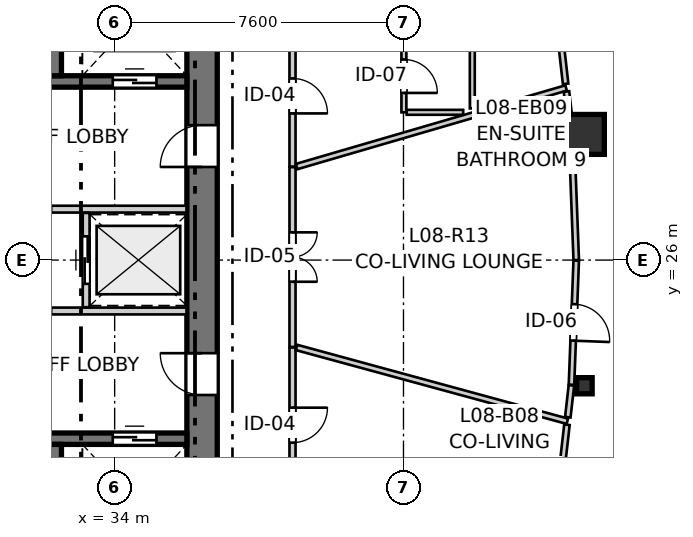
"""IFC4 building model, lengths in metres.
Left out: names, types, materials, properties, quantities, classifications, styles, units other than length and angle.
Written with IfcOpenShell. Run it as: python <this file> out.ifc"""

import sys

from ifc_helpers import new_model, si_unit, direction, frame, frame_2d, origin, origin_2d, place, context, subcontext, project, spatial, rectangle, i_section, extrude, source, transform, mapped, element, fill, save


model = new_model("IFC4")
c1 = context("Model", 3, precision=1e-05, world=origin(), true_north=direction((0.0, 1.0)))
c2 = subcontext(c1, "Body", "Model", "MODEL_VIEW")
j1 = project(units=[si_unit("LENGTHUNIT", "METRE"), si_unit("PLANEANGLEUNIT", "RADIAN")], contexts=[c1])
p1 = place(None, origin())
s1 = spatial("IfcSite", under=j1, at=p1, CompositionType="ELEMENT")
p2 = place(p1, origin())
s2 = spatial("IfcBuilding", under=s1, at=p2, CompositionType="ELEMENT")
p3 = place(p2, frame((0.0, 0.0, 30.2)))
s3 = spatial("IfcBuildingStorey", under=s2, at=p3, CompositionType="ELEMENT", Elevation=30.2)
p4 = place(p3, frame((36.3, 18.2, 0.0), z_axis=(0.0, 0.0, 1.0), x_axis=(0.0, 1.0, 0.0)))
e1 = element("IfcWall", 1, at=p4, inside=s3, PredefinedType="SHEAR", context=c2, shape_type="SweptSolid", body=[
    extrude(rectangle(XDim=15.6, YDim=0.8, at=frame_2d((7.8, 0.0))), origin(), (0.0, 0.0, 1.0), 2.935),
])
p5 = place(p4, frame((4.25, 0.0, 0.0)))
e2 = element("IfcOpeningElement", 2, at=p5, cuts=e1, PredefinedType="OPENING", context=c2, shape_type="SweptSolid", body=[
    extrude(rectangle(XDim=1.1, YDim=2.15, at=frame_2d((0.55, 1.075))), frame((0.0, 0.41, 0.0), z_axis=(0.0, -1.0, 0.0), x_axis=(1.0, 0.0, 0.0)), (0.0, 0.0, 1.0), 0.82),
])
p6 = place(p4, frame((10.25, 0.0, 0.0)))
e3 = element("IfcOpeningElement", 3, at=p6, cuts=e1, PredefinedType="OPENING", context=c2, shape_type="SweptSolid", body=[
    extrude(rectangle(XDim=1.1, YDim=2.15, at=frame_2d((0.55, 1.075))), frame((0.0, 0.41, 0.0), z_axis=(0.0, -1.0, 0.0), x_axis=(1.0, 0.0, 0.0)), (0.0, 0.0, 1.0), 0.82),
])
p7 = place(p3, frame((24.8, 21.3, 0.0), z_axis=(0.0, 0.0, 1.0), x_axis=(1.0, 0.0, 0.0)))
e4 = element("IfcWall", 4, at=p7, inside=s3, PredefinedType="SHEAR", context=c2, shape_type="SweptSolid", body=[
    extrude(rectangle(XDim=11.1, YDim=0.3, at=frame_2d((5.55, 0.0))), origin(), (0.0, 0.0, 1.0), 2.935),
])
p8 = place(p7, frame((6.22, 0.0, 0.0)))
e5 = element("IfcOpeningElement", 5, at=p8, cuts=e4, PredefinedType="OPENING", context=c2, shape_type="SweptSolid", body=[
    extrude(rectangle(XDim=0.98, YDim=2.15, at=frame_2d((0.49, 1.075))), frame((0.0, 0.16, 0.0), z_axis=(0.0, -1.0, 0.0), x_axis=(1.0, 0.0, 0.0)), (0.0, 0.0, 1.0), 0.32),
])
p9 = place(p7, frame((9.15, 0.0, 0.0)))
e6 = element("IfcOpeningElement", 6, at=p9, cuts=e4, PredefinedType="OPENING", context=c2, shape_type="SweptSolid", body=[
    extrude(rectangle(XDim=1.15, YDim=2.15, at=frame_2d((0.575, 1.075))), frame((0.0, 0.16, 0.0), z_axis=(0.0, -1.0, 0.0), x_axis=(1.0, 0.0, 0.0)), (0.0, 0.0, 1.0), 0.32),
])
p10 = place(p3, frame((32.4, 18.2, 0.0), z_axis=(0.0, 0.0, 1.0), x_axis=(0.0, 1.0, 0.0)))
e7 = element("IfcWall", 7, at=p10, inside=s3, PredefinedType="SHEAR", context=c2, shape_type="SweptSolid", body=[
    extrude(rectangle(XDim=2.95, YDim=0.4, at=frame_2d((1.475, 0.0))), origin(), (0.0, 0.0, 1.0), 2.935),
])
p11 = place(p3, frame((24.8, 30.7, 0.0), z_axis=(0.0, 0.0, 1.0), x_axis=(1.0, 0.0, 0.0)))
e8 = element("IfcWall", 8, at=p11, inside=s3, PredefinedType="SHEAR", context=c2, shape_type="SweptSolid", body=[
    extrude(rectangle(XDim=11.1, YDim=0.3, at=frame_2d((5.55, 0.0))), origin(), (0.0, 0.0, 1.0), 2.935),
])
p12 = place(p11, frame((6.22, 0.0, 0.0)))
e9 = element("IfcOpeningElement", 9, at=p12, cuts=e8, PredefinedType="OPENING", context=c2, shape_type="SweptSolid", body=[
    extrude(rectangle(XDim=0.98, YDim=2.15, at=frame_2d((0.49, 1.075))), frame((0.0, 0.16, 0.0), z_axis=(0.0, -1.0, 0.0), x_axis=(1.0, 0.0, 0.0)), (0.0, 0.0, 1.0), 0.32),
])
p13 = place(p11, frame((9.15, 0.0, 0.0)))
e10 = element("IfcOpeningElement", 10, at=p13, cuts=e8, PredefinedType="OPENING", context=c2, shape_type="SweptSolid", body=[
    extrude(rectangle(XDim=1.15, YDim=2.15, at=frame_2d((0.575, 1.075))), frame((0.0, 0.16, 0.0), z_axis=(0.0, -1.0, 0.0), x_axis=(1.0, 0.0, 0.0)), (0.0, 0.0, 1.0), 0.32),
])
p14 = place(p3, frame((32.4, 30.85, 0.0), z_axis=(0.0, 0.0, 1.0), x_axis=(0.0, 1.0, 0.0)))
e11 = element("IfcWall", 11, at=p14, inside=s3, PredefinedType="SHEAR", context=c2, shape_type="SweptSolid", body=[
    extrude(rectangle(XDim=2.95, YDim=0.4, at=frame_2d((1.475, 0.0))), origin(), (0.0, 0.0, 1.0), 2.935),
])
m1 = source(origin(), c2, "Body", "SweptSolid", [
    extrude(i_section(OverallWidth=0.409, OverallDepth=0.425, WebThickness=0.03, FlangeThickness=0.048, FilletRadius=0.015, at=origin_2d()), origin(), (0.0, 0.0, 1.0), 2.935),
])
p15 = place(p3, frame((46.361, 22.694, 0.0), z_axis=(0.0, 0.0, 1.0), x_axis=(1.0, 0.0, 0.0)))
e12 = element("IfcColumn", 12, at=p15, inside=s3, PredefinedType="PILASTER", context=c2, shape_type="MappedRepresentation", body=[
    mapped(m1, transform((0.0, 0.0, 0.0), x_axis=(1.0, 0.0, 0.0), y_axis=(0.0, 1.0, 0.0), z_axis=(0.0, 0.0, 1.0), scale=1.0)),
])
m2 = source(origin(), c2, "Body", "SweptSolid", [
    extrude(rectangle(XDim=1.05, YDim=1.05, at=origin_2d()), origin(), (0.0, 0.0, 1.0), 2.935),
])
p16 = place(p3, frame((46.361, 29.306, 0.0), z_axis=(0.0, 0.0, 1.0), x_axis=(1.0, 0.0, 0.0)))
e13 = element("IfcColumn", 13, at=p16, inside=s3, PredefinedType="COLUMN", context=c2, shape_type="MappedRepresentation", body=[
    mapped(m2, transform((0.0, 0.0, 0.0), x_axis=(1.0, 0.0, 0.0), y_axis=(0.0, 1.0, 0.0), z_axis=(0.0, 0.0, 1.0), scale=1.0)),
])
p17 = place(p3, frame((30.67, 24.66, 0.0), z_axis=(0.0, 0.0, 1.0), x_axis=(1.0, 0.0, 0.0)))
e14 = element("IfcWall", 14, at=p17, inside=s3, PredefinedType="PARTITIONING", context=c2, shape_type="SweptSolid", body=[
    extrude(rectangle(XDim=5.22, YDim=0.18, at=frame_2d((2.61, 0.0))), origin(), (0.0, 0.0, 1.0), 2.935),
])
p18 = place(p17, frame((0.68, 0.0, 0.0)))
e15 = element("IfcOpeningElement", 15, at=p18, cuts=e14, PredefinedType="OPENING", context=c2, shape_type="SweptSolid", body=[
    extrude(rectangle(XDim=0.98, YDim=2.15, at=frame_2d((0.49, 1.075))), frame((0.0, 0.1, 0.0), z_axis=(0.0, -1.0, 0.0), x_axis=(1.0, 0.0, 0.0)), (0.0, 0.0, 1.0), 0.2),
])
p19 = place(p3, frame((30.67, 27.34, 0.0), z_axis=(0.0, 0.0, 1.0), x_axis=(1.0, 0.0, 0.0)))
e16 = element("IfcWall", 16, at=p19, inside=s3, PredefinedType="PARTITIONING", context=c2, shape_type="SweptSolid", body=[
    extrude(rectangle(XDim=5.22, YDim=0.18, at=frame_2d((2.61, 0.0))), origin(), (0.0, 0.0, 1.0), 2.935),
])
p20 = place(p19, frame((0.68, 0.0, 0.0)))
e17 = element("IfcOpeningElement", 17, at=p20, cuts=e16, PredefinedType="OPENING", context=c2, shape_type="SweptSolid", body=[
    extrude(rectangle(XDim=0.98, YDim=2.15, at=frame_2d((0.49, 1.075))), frame((0.0, 0.1, 0.0), z_axis=(0.0, -1.0, 0.0), x_axis=(1.0, 0.0, 0.0)), (0.0, 0.0, 1.0), 0.2),
])
p21 = place(p3, frame((33.25, 24.76, 0.0), z_axis=(0.0, 0.0, 1.0), x_axis=(0.0, 1.0, 0.0)))
e18 = element("IfcWall", 18, at=p21, inside=s3, PredefinedType="PARTITIONING", context=c2, shape_type="SweptSolid", body=[
    extrude(rectangle(XDim=2.48, YDim=0.18, at=frame_2d((1.24, 0.0))), origin(), (0.0, 0.0, 1.0), 2.935),
])
p22 = place(p21, frame((0.615, 0.0, 0.0)))
e19 = element("IfcOpeningElement", 19, at=p22, cuts=e18, PredefinedType="OPENING", context=c2, shape_type="SweptSolid", body=[
    extrude(rectangle(XDim=1.25, YDim=2.15, at=frame_2d((0.625, 1.075))), frame((0.0, 0.1, 0.0), z_axis=(0.0, -1.0, 0.0), x_axis=(1.0, 0.0, 0.0)), (0.0, 0.0, 1.0), 0.2),
])
p23 = place(p3, frame((38.68, 28.445, 0.0), z_axis=(0.0, 0.0, 1.0), x_axis=(0.0, -1.0, 0.0)))
e20 = element("IfcWall", 20, at=p23, inside=s3, PredefinedType="PARTITIONING", context=c2, shape_type="SweptSolid", body=[
    extrude(rectangle(XDim=4.731, YDim=0.16, at=frame_2d((2.365, 0.0))), origin(), (0.0, 0.0, 1.0), 2.935),
])
p24 = place(p23, frame((1.716, 0.0, 0.0)))
e21 = element("IfcOpeningElement", 21, at=p24, cuts=e20, PredefinedType="OPENING", context=c2, shape_type="SweptSolid", body=[
    extrude(rectangle(XDim=1.3, YDim=2.1, at=frame_2d((0.65, 1.05))), frame((0.0, 0.09, 0.0), z_axis=(0.0, -1.0, 0.0), x_axis=(1.0, 0.0, 0.0)), (0.0, 0.0, 1.0), 0.18),
])
p25 = place(p3, frame((38.68, 23.699, 0.0), z_axis=(0.0, 0.0, 1.0), x_axis=(0.0, -1.0, 0.0)))
e22 = element("IfcWall", 22, at=p25, inside=s3, PredefinedType="PARTITIONING", context=c2, shape_type="SweptSolid", body=[
    extrude(rectangle(XDim=4.135, YDim=0.16, at=frame_2d((2.067, 0.0))), origin(), (0.0, 0.0, 1.0), 2.935),
])
p26 = place(p25, frame((1.583, 0.0, 0.0)))
e23 = element("IfcOpeningElement", 23, at=p26, cuts=e22, PredefinedType="OPENING", context=c2, shape_type="SweptSolid", body=[
    extrude(rectangle(XDim=0.92, YDim=2.1, at=frame_2d((0.46, 1.05))), frame((0.0, 0.09, 0.0), z_axis=(0.0, -1.0, 0.0), x_axis=(1.0, 0.0, 0.0)), (0.0, 0.0, 1.0), 0.18),
])
p27 = place(p3, frame((38.68, 32.175, 0.0), z_axis=(0.0, 0.0, 1.0), x_axis=(0.0, -1.0, 0.0)))
e24 = element("IfcWall", 24, at=p27, inside=s3, PredefinedType="PARTITIONING", context=c2, shape_type="SweptSolid", body=[
    extrude(rectangle(XDim=3.715, YDim=0.16, at=frame_2d((1.857, 0.0))), origin(), (0.0, 0.0, 1.0), 2.935),
])
p28 = place(p27, frame((1.396, 0.0, 0.0)))
e25 = element("IfcOpeningElement", 25, at=p28, cuts=e24, PredefinedType="OPENING", context=c2, shape_type="SweptSolid", body=[
    extrude(rectangle(XDim=0.92, YDim=2.1, at=frame_2d((0.46, 1.05))), frame((0.0, 0.09, 0.0), z_axis=(0.0, -1.0, 0.0), x_axis=(1.0, 0.0, 0.0)), (0.0, 0.0, 1.0), 0.18),
])
p29 = place(p3, frame((46.146, 25.985, 0.0), z_axis=(0.0, 0.0, 1.0), x_axis=(-0.038094618751, -0.999274136572, 0.0)))
e26 = element("IfcWall", 26, at=p29, inside=s3, PredefinedType="PARTITIONING", context=c2, shape_type="SweptSolid", body=[
    extrude(rectangle(XDim=3.269, YDim=0.145, at=frame_2d((1.634, 0.0))), origin(), (0.0, 0.0, 1.0), 2.403),
])
p30 = place(p29, frame((1.147, 0.0, 0.0)))
e27 = element("IfcOpeningElement", 27, at=p30, cuts=e26, PredefinedType="OPENING", context=c2, shape_type="SweptSolid", body=[
    extrude(rectangle(XDim=0.96, YDim=2.1, at=frame_2d((0.48, 1.05))), frame((0.0, 0.083, 0.0), z_axis=(0.0, -1.0, 0.0), x_axis=(1.0, 0.0, 0.0)), (0.0, 0.0, 1.0), 0.165),
])
p31 = place(p3, frame((41.611, 31.788, 0.0), z_axis=(0.0, 0.0, 1.0), x_axis=(0.0, -1.0, 0.0)))
e28 = element("IfcWall", 28, at=p31, inside=s3, PredefinedType="PARTITIONING", context=c2, shape_type="SweptSolid", body=[
    extrude(rectangle(XDim=1.9, YDim=0.13, at=frame_2d((0.95, 0.0))), origin(), (0.0, 0.0, 1.0), 2.935),
])
p32 = place(p31, frame((0.51, 0.0, 0.0)))
e29 = element("IfcOpeningElement", 29, at=p32, cuts=e28, PredefinedType="OPENING", context=c2, shape_type="SweptSolid", body=[
    extrude(rectangle(XDim=0.88, YDim=2.05, at=frame_2d((0.44, 1.025))), frame((0.0, 0.075, 0.0), z_axis=(0.0, -1.0, 0.0), x_axis=(1.0, 0.0, 0.0)), (0.0, 0.0, 1.0), 0.15),
])
p33 = place(p3, frame((38.788, 28.46, 0.0), z_axis=(0.0, 0.0, 1.0), x_axis=(0.959983709987, 0.280055845432, 0.0)))
e30 = element("IfcWall", 30, at=p33, inside=s3, PredefinedType="PARTITIONING", context=c2, shape_type="SweptSolid", body=[
    extrude(rectangle(XDim=7.386, YDim=0.145, at=frame_2d((3.693, 0.0))), origin(), (0.0, 0.0, 1.0), 2.935),
])
p34 = place(p3, frame((38.787, 23.701, 0.0), z_axis=(0.0, 0.0, 1.0), x_axis=(0.964810342249, -0.262946769308, 0.0)))
e31 = element("IfcWall", 31, at=p34, inside=s3, PredefinedType="PARTITIONING", context=c2, shape_type="SweptSolid", body=[
    extrude(rectangle(XDim=7.385, YDim=0.145, at=frame_2d((3.692, 0.0))), origin(), (0.0, 0.0, 1.0), 2.935),
])
p35 = place(p3, frame((46.021, 29.281, 0.0), z_axis=(0.0, 0.0, 1.0), x_axis=(0.038070453861, -0.999275057501, 0.0)))
e32 = element("IfcWall", 32, at=p35, inside=s3, PredefinedType="PARTITIONING", context=c2, shape_type="SweptSolid", body=[
    extrude(rectangle(XDim=3.283, YDim=0.145, at=frame_2d((1.642, 0.0))), origin(), (0.0, 0.0, 1.0), 2.403),
])
p36 = place(p3, frame((43.411, 29.99, 0.0), z_axis=(0.0, 0.0, 1.0), x_axis=(0.0, 1.0, 0.0)))
e33 = element("IfcWall", 33, at=p36, inside=s3, PredefinedType="PARTITIONING", context=c2, shape_type="SweptSolid", body=[
    extrude(rectangle(XDim=1.798, YDim=0.13, at=frame_2d((0.899, 0.0))), origin(), (0.0, 0.0, 1.0), 2.935),
])
p37 = place(p3, frame((41.684, 29.888, 0.0), z_axis=(0.0, 0.0, 1.0), x_axis=(1.0, 0.0, 0.0)))
e34 = element("IfcWall", 34, at=p37, inside=s3, PredefinedType="PARTITIONING", context=c2, shape_type="SweptSolid", body=[
    extrude(rectangle(XDim=1.487, YDim=0.13, at=frame_2d((0.743, 0.0))), origin(), (0.0, 0.0, 1.0), 2.935),
])
p38 = place(p3, frame((45.729, 20.146, 0.0), z_axis=(0.0, 0.0, 1.0), x_axis=(0.113074294354, 0.993586535716, 0.0)))
e35 = element("IfcWall", 35, at=p38, inside=s3, PredefinedType="PARTITIONING", context=c2, shape_type="SweptSolid", body=[
    extrude(rectangle(XDim=1.531, YDim=0.145, at=frame_2d((0.765, 0.0))), origin(), (0.0, 0.0, 1.0), 2.403),
])
p39 = place(p3, frame((45.89, 30.436, 0.0), z_axis=(0.0, 0.0, 1.0), x_axis=(0.113024308153, -0.993592223081, 0.0)))
e36 = element("IfcWall", 36, at=p39, inside=s3, PredefinedType="PARTITIONING", context=c2, shape_type="SweptSolid", body=[
    extrude(rectangle(XDim=1.147, YDim=0.145, at=frame_2d((0.573, 0.0))), origin(), (0.0, 0.0, 1.0), 2.403),
])
p40 = place(p3, frame((45.729, 31.854, 0.0), z_axis=(0.0, 0.0, 1.0), x_axis=(0.112860473391, -0.993610846129, 0.0)))
e37 = element("IfcWall", 37, at=p40, inside=s3, PredefinedType="PARTITIONING", context=c2, shape_type="SweptSolid", body=[
    extrude(rectangle(XDim=1.224, YDim=0.145, at=frame_2d((0.612, 0.0))), origin(), (0.0, 0.0, 1.0), 2.403),
])
p41 = place(p3, frame((45.924, 21.866, 0.0), z_axis=(0.0, 0.0, 1.0), x_axis=(0.112844765803, 0.993612630169, 0.0)))
e38 = element("IfcWall", 38, at=p41, inside=s3, PredefinedType="PARTITIONING", context=c2, shape_type="SweptSolid", body=[
    extrude(rectangle(XDim=0.844, YDim=0.145, at=frame_2d((0.422, 0.0))), origin(), (0.0, 0.0, 1.0), 2.403),
])
m3 = source(origin(), c2, "Body", "SweptSolid", [
    extrude(rectangle(XDim=1.15, YDim=2.15, at=frame_2d((0.575, 1.075))), frame((0.0, 0.025, 0.0), z_axis=(0.0, -1.0, 0.0), x_axis=(1.0, 0.0, 0.0)), (0.0, 0.0, 1.0), 0.05),
])
p42 = place(p9, origin())
e39 = element("IfcDoor", 39, at=p42, inside=s3, OperationType="DOUBLE_DOOR_SLIDING", PredefinedType="DOOR", context=c2, shape_type="MappedRepresentation", body=[
    mapped(m3, transform((0.0, 0.0, 0.0), x_axis=(1.0, 0.0, 0.0), y_axis=(0.0, 1.0, 0.0), z_axis=(0.0, 0.0, 1.0), scale=1.0)),
])
fill(e6, e39)
p43 = place(p13, origin())
e40 = element("IfcDoor", 40, at=p43, inside=s3, OperationType="DOUBLE_DOOR_SLIDING", PredefinedType="DOOR", context=c2, shape_type="MappedRepresentation", body=[
    mapped(m3, transform((0.0, 0.0, 0.0), x_axis=(1.0, 0.0, 0.0), y_axis=(0.0, 1.0, 0.0), z_axis=(0.0, 0.0, 1.0), scale=1.0)),
])
fill(e10, e40)
m4 = source(origin(), c2, "Body", "SweptSolid", [
    extrude(rectangle(XDim=1.1, YDim=2.15, at=frame_2d((0.55, 1.075))), frame((0.0, 0.025, 0.0), z_axis=(0.0, -1.0, 0.0), x_axis=(1.0, 0.0, 0.0)), (0.0, 0.0, 1.0), 0.05),
])
p44 = place(p5, origin())
e41 = element("IfcDoor", 41, at=p44, inside=s3, OperationType="SINGLE_SWING_RIGHT", PredefinedType="DOOR", context=c2, shape_type="MappedRepresentation", body=[
    mapped(m4, transform((0.0, 0.0, 0.0), x_axis=(1.0, 0.0, 0.0), y_axis=(0.0, 1.0, 0.0), z_axis=(0.0, 0.0, 1.0), scale=1.0)),
])
fill(e2, e41)
p45 = place(p6, origin())
e42 = element("IfcDoor", 42, at=p45, inside=s3, OperationType="SINGLE_SWING_LEFT", PredefinedType="DOOR", context=c2, shape_type="MappedRepresentation", body=[
    mapped(m4, transform((0.0, 0.0, 0.0), x_axis=(1.0, 0.0, 0.0), y_axis=(0.0, 1.0, 0.0), z_axis=(0.0, 0.0, 1.0), scale=1.0)),
])
fill(e3, e42)
m5 = source(origin(), c2, "Body", "SweptSolid", [
    extrude(rectangle(XDim=1.25, YDim=2.15, at=frame_2d((0.625, 1.075))), frame((0.0, 0.025, 0.0), z_axis=(0.0, -1.0, 0.0), x_axis=(1.0, 0.0, 0.0)), (0.0, 0.0, 1.0), 0.05),
])
p46 = place(p22, origin())
e43 = element("IfcDoor", 43, at=p46, inside=s3, OperationType="DOUBLE_DOOR_SLIDING", PredefinedType="DOOR", context=c2, shape_type="MappedRepresentation", body=[
    mapped(m5, transform((0.0, 0.0, 0.0), x_axis=(1.0, 0.0, 0.0), y_axis=(0.0, 1.0, 0.0), z_axis=(0.0, 0.0, 1.0), scale=1.0)),
])
fill(e19, e43)
m6 = source(origin(), c2, "Body", "SweptSolid", [
    extrude(rectangle(XDim=1.3, YDim=2.1, at=frame_2d((0.65, 1.05))), frame((0.0, 0.025, 0.0), z_axis=(0.0, -1.0, 0.0), x_axis=(1.0, 0.0, 0.0)), (0.0, 0.0, 1.0), 0.05),
])
p47 = place(p24, origin())
e44 = element("IfcDoor", 44, at=p47, inside=s3, OperationType="DOUBLE_DOOR_SINGLE_SWING", PredefinedType="DOOR", context=c2, shape_type="MappedRepresentation", body=[
    mapped(m6, transform((0.0, 0.0, 0.0), x_axis=(1.0, 0.0, 0.0), y_axis=(0.0, 1.0, 0.0), z_axis=(0.0, 0.0, 1.0), scale=1.0)),
])
fill(e21, e44)
m7 = source(origin(), c2, "Body", "SweptSolid", [
    extrude(rectangle(XDim=0.92, YDim=2.1, at=frame_2d((0.46, 1.05))), frame((0.0, 0.025, 0.0), z_axis=(0.0, -1.0, 0.0), x_axis=(1.0, 0.0, 0.0)), (0.0, 0.0, 1.0), 0.05),
])
p48 = place(p26, origin())
e45 = element("IfcDoor", 45, at=p48, inside=s3, OperationType="SINGLE_SWING_LEFT", PredefinedType="DOOR", context=c2, shape_type="MappedRepresentation", body=[
    mapped(m7, transform((0.0, 0.0, 0.0), x_axis=(1.0, 0.0, 0.0), y_axis=(0.0, 1.0, 0.0), z_axis=(0.0, 0.0, 1.0), scale=1.0)),
])
fill(e23, e45)
p49 = place(p28, origin())
e46 = element("IfcDoor", 46, at=p49, inside=s3, OperationType="SINGLE_SWING_RIGHT", PredefinedType="DOOR", context=c2, shape_type="MappedRepresentation", body=[
    mapped(m7, transform((0.0, 0.0, 0.0), x_axis=(1.0, 0.0, 0.0), y_axis=(0.0, 1.0, 0.0), z_axis=(0.0, 0.0, 1.0), scale=1.0)),
])
fill(e25, e46)
m8 = source(origin(), c2, "Body", "SweptSolid", [
    extrude(rectangle(XDim=0.96, YDim=2.1, at=frame_2d((0.48, 1.05))), frame((0.0, 0.025, 0.0), z_axis=(0.0, -1.0, 0.0), x_axis=(1.0, 0.0, 0.0)), (0.0, 0.0, 1.0), 0.05),
])
p50 = place(p30, origin())
e47 = element("IfcDoor", 47, at=p50, inside=s3, OperationType="SINGLE_SWING_RIGHT", PredefinedType="DOOR", context=c2, shape_type="MappedRepresentation", body=[
    mapped(m8, transform((0.0, 0.0, 0.0), x_axis=(1.0, 0.0, 0.0), y_axis=(0.0, 1.0, 0.0), z_axis=(0.0, 0.0, 1.0), scale=1.0)),
])
fill(e27, e47)
m9 = source(origin(), c2, "Body", "SweptSolid", [
    extrude(rectangle(XDim=0.88, YDim=2.05, at=frame_2d((0.44, 1.025))), frame((0.0, 0.025, 0.0), z_axis=(0.0, -1.0, 0.0), x_axis=(1.0, 0.0, 0.0)), (0.0, 0.0, 1.0), 0.05),
])
p51 = place(p32, origin())
e48 = element("IfcDoor", 48, at=p51, inside=s3, OperationType="SINGLE_SWING_RIGHT", PredefinedType="DOOR", context=c2, shape_type="MappedRepresentation", body=[
    mapped(m9, transform((0.0, 0.0, 0.0), x_axis=(1.0, 0.0, 0.0), y_axis=(0.0, 1.0, 0.0), z_axis=(0.0, 0.0, 1.0), scale=1.0)),
])
fill(e29, e48)
save(model, sys.argv[1])
